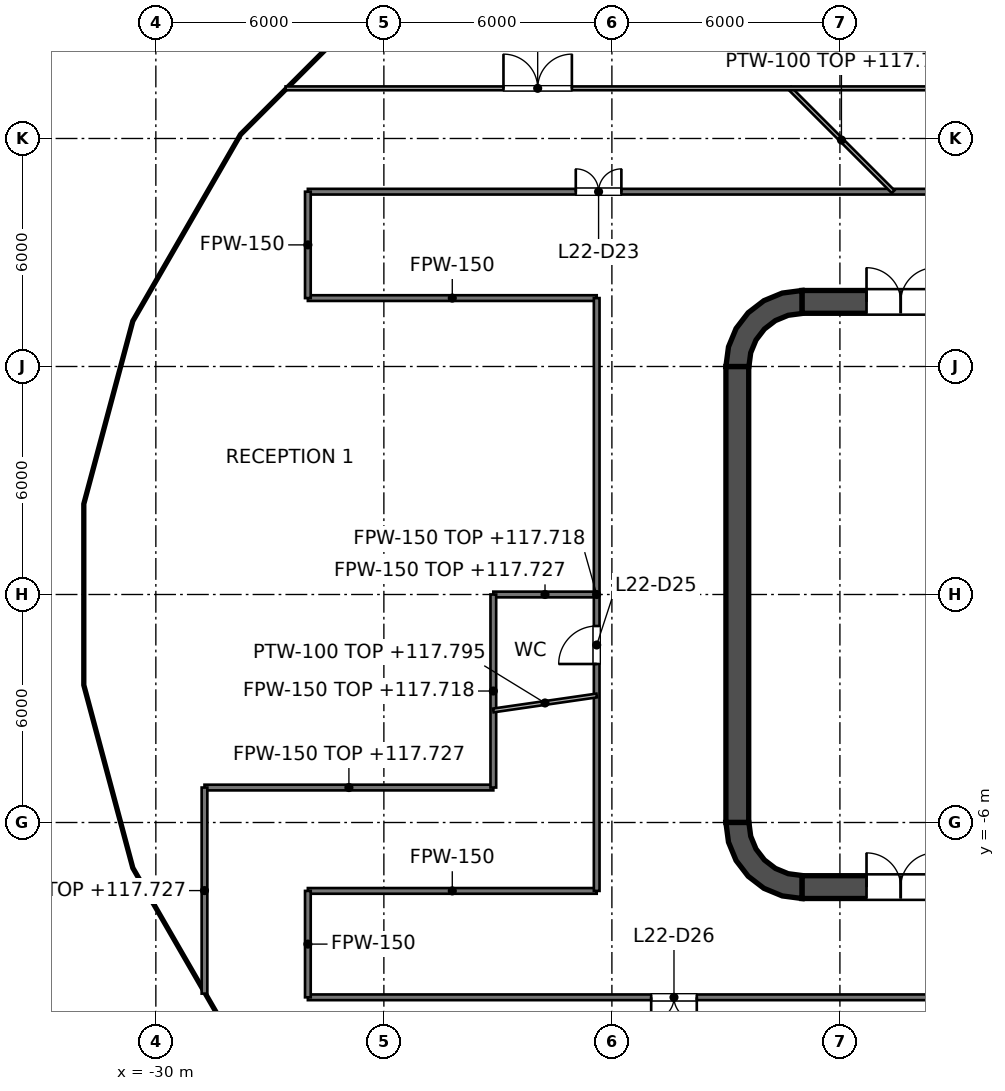
"""IFC4 building model, lengths in metres.
Left out: names, types, materials, properties, quantities, classifications, styles, units other than length and angle.
Written with IfcOpenShell. Run it as: python <this file> out.ifc"""

import sys

from ifc_helpers import new_model, si_unit, direction, frame, frame_2d, origin, place, context, subcontext, project, spatial, polyline, rectangle, outline, extrude, element, fill, save


model = new_model("IFC4")
c1 = context("Model", 3, precision=1e-05, world=origin(), true_north=direction((0.0, 1.0)))
c2 = subcontext(c1, "Body", "Model", "MODEL_VIEW")
j1 = project(units=[si_unit("LENGTHUNIT", "METRE"), si_unit("PLANEANGLEUNIT", "RADIAN")], contexts=[c1])
p1 = place(None, origin())
s1 = spatial("IfcSite", under=j1, at=p1, CompositionType="ELEMENT")
p2 = place(p1, origin())
s2 = spatial("IfcBuilding", under=s1, at=p2, CompositionType="ELEMENT")
p3 = place(p2, frame((0.0, 0.0, 114.6)))
s3 = spatial("IfcBuildingStorey", under=s2, at=p3, CompositionType="ELEMENT", Elevation=114.6)
p4 = place(p3, frame((-13.0, 7.7, 0.0), z_axis=(0.0, 0.0, 1.0), x_axis=(1.0, 0.0, 0.0)))
e1 = element("IfcWall", 1, at=p4, inside=s3, PredefinedType="SHEAR", context=c2, shape_type="SweptSolid", body=[
    extrude(rectangle(XDim=26.0, YDim=0.6, at=frame_2d((13.0, 0.0))), origin(), (0.0, 0.0, 1.0), 4.2),
])
p5 = place(p4, frame((1.7, 0.0, 0.0)))
e2 = element("IfcOpeningElement", 2, at=p5, cuts=e1, PredefinedType="OPENING", context=c2, shape_type="SweptSolid", body=[
    extrude(rectangle(XDim=1.8, YDim=2.1, at=frame_2d((0.9, 1.05))), frame((0.0, 0.3, 0.0), z_axis=(0.0, -1.0, 0.0), x_axis=(1.0, 0.0, 0.0)), (0.0, 0.0, 1.0), 0.6),
])
p6 = place(p4, frame((22.5, 0.0, 0.0)))
e3 = element("IfcOpeningElement", 3, at=p6, cuts=e1, PredefinedType="OPENING", context=c2, shape_type="SweptSolid", body=[
    extrude(rectangle(XDim=1.8, YDim=2.1, at=frame_2d((0.9, 1.05))), frame((0.0, 0.3, 0.0), z_axis=(0.0, -1.0, 0.0), x_axis=(1.0, 0.0, 0.0)), (0.0, 0.0, 1.0), 0.6),
])
p7 = place(p3, frame((-13.0, -7.7, 0.0), z_axis=(0.0, 0.0, 1.0), x_axis=(1.0, 0.0, 0.0)))
e4 = element("IfcWall", 4, at=p7, inside=s3, PredefinedType="SHEAR", context=c2, shape_type="SweptSolid", body=[
    extrude(rectangle(XDim=26.0, YDim=0.6, at=frame_2d((13.0, 0.0))), origin(), (0.0, 0.0, 1.0), 4.2),
])
p8 = place(p7, frame((1.7, 0.0, 0.0)))
e5 = element("IfcOpeningElement", 5, at=p8, cuts=e4, PredefinedType="OPENING", context=c2, shape_type="SweptSolid", body=[
    extrude(rectangle(XDim=1.8, YDim=2.1, at=frame_2d((0.9, 1.05))), frame((0.0, 0.3, 0.0), z_axis=(0.0, -1.0, 0.0), x_axis=(1.0, 0.0, 0.0)), (0.0, 0.0, 1.0), 0.6),
])
p9 = place(p7, frame((22.5, 0.0, 0.0)))
e6 = element("IfcOpeningElement", 6, at=p9, cuts=e4, PredefinedType="OPENING", context=c2, shape_type="SweptSolid", body=[
    extrude(rectangle(XDim=1.8, YDim=2.1, at=frame_2d((0.9, 1.05))), frame((0.0, 0.3, 0.0), z_axis=(0.0, -1.0, 0.0), x_axis=(1.0, 0.0, 0.0)), (0.0, 0.0, 1.0), 0.6),
])
p10 = place(p3, frame((-14.7, -6.0, 0.0), z_axis=(0.0, 0.0, 1.0), x_axis=(0.0, 1.0, 0.0)))
e7 = element("IfcWall", 7, at=p10, inside=s3, PredefinedType="SHEAR", context=c2, shape_type="SweptSolid", body=[
    extrude(rectangle(XDim=12.0, YDim=0.6, at=frame_2d((6.0, 0.0))), origin(), (0.0, 0.0, 1.0), 4.2),
])
p11 = place(p3, origin())
e8 = element("IfcWall", 8, at=p11, inside=s3, PredefinedType="SHEAR", context=c2, shape_type="SweptSolid", body=[
    extrude(outline(polyline([(-15.0, 6.0), (-14.395, 6.0), (-14.347, 6.361), (-14.208, 6.698), (-13.986, 6.986), (-13.698, 7.208), (-13.361, 7.347), (-13.0, 7.395), (-13.0, 8.0), (-13.518, 7.932), (-14.0, 7.732), (-14.414, 7.414), (-14.732, 7.0), (-14.932, 6.518), (-15.0, 6.0)])), origin(), (0.0, 0.0, 1.0), 4.2),
])
e9 = element("IfcWall", 9, at=p11, inside=s3, PredefinedType="SHEAR", context=c2, shape_type="SweptSolid", body=[
    extrude(outline(polyline([(-13.0, -8.0), (-13.0, -7.395), (-13.361, -7.347), (-13.698, -7.208), (-13.986, -6.986), (-14.208, -6.698), (-14.347, -6.361), (-14.395, -6.0), (-15.0, -6.0), (-14.932, -6.518), (-14.732, -7.0), (-14.414, -7.414), (-14.0, -7.732), (-13.518, -7.932), (-13.0, -8.0)])), origin(), (0.0, 0.0, 1.0), 4.2),
])
p12 = place(p3, frame((-11.8, -7.4, 0.0), z_axis=(0.0, 0.0, 1.0), x_axis=(0.0, 1.0, 0.0)))
e10 = element("IfcWall", 10, at=p12, inside=s3, PredefinedType="SOLIDWALL", context=c2, shape_type="SweptSolid", body=[
    extrude(rectangle(XDim=14.8, YDim=0.4, at=frame_2d((7.4, 0.0))), origin(), (0.0, 0.0, 1.0), 4.05),
])
p13 = place(p12, frame((11.2, 0.0, 0.0)))
e11 = element("IfcOpeningElement", 11, at=p13, cuts=e10, PredefinedType="OPENING", context=c2, shape_type="SweptSolid", body=[
    extrude(rectangle(XDim=1.1, YDim=2.1, at=frame_2d((0.55, 1.05))), frame((0.0, 0.2, 0.0), z_axis=(0.0, -1.0, 0.0), x_axis=(1.0, 0.0, 0.0)), (0.0, 0.0, 1.0), 0.4),
])
p14 = place(p12, frame((8.3, 0.0, 0.0)))
e12 = element("IfcOpeningElement", 12, at=p14, cuts=e10, PredefinedType="OPENING", context=c2, shape_type="SweptSolid", body=[
    extrude(rectangle(XDim=1.1, YDim=2.1, at=frame_2d((0.55, 1.05))), frame((0.0, 0.2, 0.0), z_axis=(0.0, -1.0, 0.0), x_axis=(1.0, 0.0, 0.0)), (0.0, 0.0, 1.0), 0.4),
])
p15 = place(p12, frame((5.4, 0.0, 0.0)))
e13 = element("IfcOpeningElement", 13, at=p15, cuts=e10, PredefinedType="OPENING", context=c2, shape_type="SweptSolid", body=[
    extrude(rectangle(XDim=1.1, YDim=2.1, at=frame_2d((0.55, 1.05))), frame((0.0, 0.2, 0.0), z_axis=(0.0, -1.0, 0.0), x_axis=(1.0, 0.0, 0.0)), (0.0, 0.0, 1.0), 0.4),
])
p16 = place(p12, frame((13.552, 0.0, 0.0)))
e14 = element("IfcOpeningElement", 14, at=p16, cuts=e10, PredefinedType="OPENING", context=c2, shape_type="SweptSolid", body=[
    extrude(rectangle(XDim=0.9, YDim=2.1, at=frame_2d((0.45, 1.05))), frame((0.0, 0.2, 0.0), z_axis=(0.0, -1.0, 0.0), x_axis=(1.0, 0.0, 0.0)), (0.0, 0.0, 1.0), 0.4),
])
p17 = place(p12, frame((0.347, 0.0, 0.0)))
e15 = element("IfcOpeningElement", 15, at=p17, cuts=e10, PredefinedType="OPENING", context=c2, shape_type="SweptSolid", body=[
    extrude(rectangle(XDim=0.9, YDim=2.1, at=frame_2d((0.45, 1.05))), frame((0.0, 0.2, 0.0), z_axis=(0.0, -1.0, 0.0), x_axis=(1.0, 0.0, 0.0)), (0.0, 0.0, 1.0), 0.4),
])
e16 = element("IfcWall", 16, at=p11, inside=s3, PredefinedType="SOLIDWALL", context=c2, shape_type="SweptSolid", body=[
    extrude(outline(polyline([(-12.0, -5.925), (-12.0, -5.675), (-14.15, -5.675), (-14.15, -3.025), (-12.0, -3.025), (-12.0, -2.775), (-14.15, -2.775), (-14.15, -0.125), (-12.0, -0.125), (-12.0, 0.125), (-14.15, 0.125), (-14.15, 2.775), (-12.0, 2.775), (-12.0, 3.025), (-14.15, 3.025), (-14.15, 5.675), (-12.0, 5.675), (-12.0, 5.925), (-14.15, 5.925), (-14.4, 5.925), (-14.4, 5.675), (-14.4, 3.025), (-14.4, 2.775), (-14.4, 0.125), (-14.4, -0.125), (-14.4, -2.775), (-14.4, -3.025), (-14.4, -5.675), (-14.4, -5.925), (-14.15, -5.925), (-12.0, -5.925)])), origin(), (0.0, 0.0, 1.0), 4.05),
])
p18 = place(p3, frame((-26.0, -10.6, 0.0), z_axis=(0.0, 0.0, 1.0), x_axis=(1.0, 0.0, 0.0)))
e17 = element("IfcWall", 17, at=p18, inside=s3, PredefinedType="PARTITIONING", context=c2, shape_type="SweptSolid", body=[
    extrude(rectangle(XDim=52.0, YDim=0.15, at=frame_2d((26.0, 0.0))), origin(), (0.0, 0.0, 1.0), 3.127),
])
p19 = place(p18, frame((9.034, 0.0, 0.0)))
e18 = element("IfcOpeningElement", 18, at=p19, cuts=e17, PredefinedType="OPENING", context=c2, shape_type="SweptSolid", body=[
    extrude(rectangle(XDim=1.2, YDim=2.1, at=frame_2d((0.6, 1.05))), frame((0.0, 0.075, 0.0), z_axis=(0.0, -1.0, 0.0), x_axis=(1.0, 0.0, 0.0)), (0.0, 0.0, 1.0), 0.15),
])
p20 = place(p18, frame((19.767, 0.0, 0.0)))
e19 = element("IfcOpeningElement", 19, at=p20, cuts=e17, PredefinedType="OPENING", context=c2, shape_type="SweptSolid", body=[
    extrude(rectangle(XDim=1.0, YDim=2.1, at=frame_2d((0.5, 1.05))), frame((0.0, 0.075, 0.0), z_axis=(0.0, -1.0, 0.0), x_axis=(1.0, 0.0, 0.0)), (0.0, 0.0, 1.0), 0.15),
])
p21 = place(p18, frame((21.763, 0.0, 0.0)))
e20 = element("IfcOpeningElement", 20, at=p21, cuts=e17, PredefinedType="OPENING", context=c2, shape_type="SweptSolid", body=[
    extrude(rectangle(XDim=1.0, YDim=2.1, at=frame_2d((0.5, 1.05))), frame((0.0, 0.075, 0.0), z_axis=(0.0, -1.0, 0.0), x_axis=(1.0, 0.0, 0.0)), (0.0, 0.0, 1.0), 0.15),
])
p22 = place(p18, frame((29.38, 0.0, 0.0)))
e21 = element("IfcOpeningElement", 21, at=p22, cuts=e17, PredefinedType="OPENING", context=c2, shape_type="SweptSolid", body=[
    extrude(rectangle(XDim=1.0, YDim=2.1, at=frame_2d((0.5, 1.05))), frame((0.0, 0.075, 0.0), z_axis=(0.0, -1.0, 0.0), x_axis=(1.0, 0.0, 0.0)), (0.0, 0.0, 1.0), 0.15),
])
p23 = place(p18, frame((41.202, 0.0, 0.0)))
e22 = element("IfcOpeningElement", 22, at=p23, cuts=e17, PredefinedType="OPENING", context=c2, shape_type="SweptSolid", body=[
    extrude(rectangle(XDim=1.0, YDim=2.1, at=frame_2d((0.5, 1.05))), frame((0.0, 0.075, 0.0), z_axis=(0.0, -1.0, 0.0), x_axis=(1.0, 0.0, 0.0)), (0.0, 0.0, 1.0), 0.15),
])
p24 = place(p3, frame((-26.0, -7.8, 0.0), z_axis=(0.0, 0.0, 1.0), x_axis=(1.0, 0.0, 0.0)))
e23 = element("IfcWall", 23, at=p24, inside=s3, PredefinedType="PARTITIONING", context=c2, shape_type="SweptSolid", body=[
    extrude(rectangle(XDim=7.6, YDim=0.15, at=frame_2d((3.8, 0.0))), origin(), (0.0, 0.0, 1.0), 3.276),
])
p25 = place(p3, frame((-28.72, -5.08, 0.0), z_axis=(0.0, 0.0, 1.0), x_axis=(1.0, 0.0, 0.0)))
e24 = element("IfcWall", 24, at=p25, inside=s3, PredefinedType="PARTITIONING", context=c2, shape_type="SweptSolid", body=[
    extrude(rectangle(XDim=7.6, YDim=0.15, at=frame_2d((3.8, 0.0))), origin(), (0.0, 0.0, 1.0), 3.127),
])
p26 = place(p3, frame((-21.12, 0.0, 0.0), z_axis=(0.0, 0.0, 1.0), x_axis=(1.0, 0.0, 0.0)))
e25 = element("IfcWall", 25, at=p26, inside=s3, PredefinedType="PARTITIONING", context=c2, shape_type="SweptSolid", body=[
    extrude(rectangle(XDim=2.72, YDim=0.15, at=frame_2d((1.36, 0.0))), origin(), (0.0, 0.0, 1.0), 3.127),
])
p27 = place(p3, frame((-26.0, 7.8, 0.0), z_axis=(0.0, 0.0, 1.0), x_axis=(1.0, 0.0, 0.0)))
e26 = element("IfcWall", 26, at=p27, inside=s3, PredefinedType="PARTITIONING", context=c2, shape_type="SweptSolid", body=[
    extrude(rectangle(XDim=7.6, YDim=0.15, at=frame_2d((3.8, 0.0))), origin(), (0.0, 0.0, 1.0), 3.276),
])
p28 = place(p3, frame((-26.0, 10.6, 0.0), z_axis=(0.0, 0.0, 1.0), x_axis=(1.0, 0.0, 0.0)))
e27 = element("IfcWall", 27, at=p28, inside=s3, PredefinedType="PARTITIONING", context=c2, shape_type="SweptSolid", body=[
    extrude(rectangle(XDim=52.0, YDim=0.15, at=frame_2d((26.0, 0.0))), origin(), (0.0, 0.0, 1.0), 3.077),
])
p29 = place(p28, frame((18.729, 0.0, 0.0)))
e28 = element("IfcOpeningElement", 28, at=p29, cuts=e27, PredefinedType="OPENING", context=c2, shape_type="SweptSolid", body=[
    extrude(rectangle(XDim=1.0, YDim=2.1, at=frame_2d((0.5, 1.05))), frame((0.0, 0.075, 0.0), z_axis=(0.0, -1.0, 0.0), x_axis=(1.0, 0.0, 0.0)), (0.0, 0.0, 1.0), 0.15),
])
p30 = place(p28, frame((7.05, 0.0, 0.0)))
e29 = element("IfcOpeningElement", 29, at=p30, cuts=e27, PredefinedType="OPENING", context=c2, shape_type="SweptSolid", body=[
    extrude(rectangle(XDim=1.2, YDim=2.1, at=frame_2d((0.6, 1.05))), frame((0.0, 0.075, 0.0), z_axis=(0.0, -1.0, 0.0), x_axis=(1.0, 0.0, 0.0)), (0.0, 0.0, 1.0), 0.15),
])
p31 = place(p28, frame((40.464, 0.0, 0.0)))
e30 = element("IfcOpeningElement", 30, at=p31, cuts=e27, PredefinedType="OPENING", context=c2, shape_type="SweptSolid", body=[
    extrude(rectangle(XDim=1.0, YDim=2.1, at=frame_2d((0.5, 1.05))), frame((0.0, 0.075, 0.0), z_axis=(0.0, -1.0, 0.0), x_axis=(1.0, 0.0, 0.0)), (0.0, 0.0, 1.0), 0.15),
])
p32 = place(p28, frame((27.09, 0.0, 0.0)))
e31 = element("IfcOpeningElement", 31, at=p32, cuts=e27, PredefinedType="OPENING", context=c2, shape_type="SweptSolid", body=[
    extrude(rectangle(XDim=1.0, YDim=2.1, at=frame_2d((0.5, 1.05))), frame((0.0, 0.075, 0.0), z_axis=(0.0, -1.0, 0.0), x_axis=(1.0, 0.0, 0.0)), (0.0, 0.0, 1.0), 0.15),
])
p33 = place(p3, frame((-18.4, -7.8, 0.0), z_axis=(0.0, 0.0, 1.0), x_axis=(0.0, 1.0, 0.0)))
e32 = element("IfcWall", 32, at=p33, inside=s3, PredefinedType="PARTITIONING", context=c2, shape_type="SweptSolid", body=[
    extrude(rectangle(XDim=15.6, YDim=0.15, at=frame_2d((7.8, 0.0))), origin(), (0.0, 0.0, 1.0), 3.118),
])
p34 = place(p33, frame((5.971, 0.0, 0.0)))
e33 = element("IfcOpeningElement", 33, at=p34, cuts=e32, PredefinedType="OPENING", context=c2, shape_type="SweptSolid", body=[
    extrude(rectangle(XDim=1.0, YDim=2.1, at=frame_2d((0.5, 1.05))), frame((0.0, 0.075, 0.0), z_axis=(0.0, -1.0, 0.0), x_axis=(1.0, 0.0, 0.0)), (0.0, 0.0, 1.0), 0.15),
])
p35 = place(p3, frame((-21.12, -5.08, 0.0), z_axis=(0.0, 0.0, 1.0), x_axis=(0.0, 1.0, 0.0)))
e34 = element("IfcWall", 34, at=p35, inside=s3, PredefinedType="PARTITIONING", context=c2, shape_type="SweptSolid", body=[
    extrude(rectangle(XDim=5.08, YDim=0.15, at=frame_2d((2.54, 0.0))), origin(), (0.0, 0.0, 1.0), 3.118),
])
for number, where, z_axis, x_axis in (
    (35, (-26.0, -10.6, 0.0), (0.0, 0.0, 1.0), (0.0, 1.0, 0.0)),
    (36, (-26.0, 7.8, 0.0), (0.0, 0.0, 1.0), (0.0, 1.0, 0.0)),
):
    element("IfcWall", number, at=place(p3, frame(where, z_axis=z_axis, x_axis=x_axis)), inside=s3, PredefinedType="PARTITIONING", context=c2, shape_type="SweptSolid", body=[
        extrude(rectangle(XDim=2.8, YDim=0.15, at=frame_2d((1.4, 0.0))), origin(), (0.0, 0.0, 1.0), 3.276),
    ])
p36 = place(p3, frame((-28.72, -10.503, 0.0), z_axis=(0.0, 0.0, 1.0), x_axis=(0.0, 1.0, 0.0)))
e37 = element("IfcWall", 37, at=p36, inside=s3, PredefinedType="PARTITIONING", context=c2, shape_type="SweptSolid", body=[
    extrude(rectangle(XDim=5.423, YDim=0.15, at=frame_2d((2.711, 0.0))), origin(), (0.0, 0.0, 1.0), 3.127),
])
p37 = place(p3, frame((-13.32, 13.32, 0.0), z_axis=(0.0, 0.0, 1.0), x_axis=(0.707106781187, -0.707106781187, 0.0)))
e38 = element("IfcWall", 38, at=p37, inside=s3, PredefinedType="PARTITIONING", context=c2, shape_type="SweptSolid", body=[
    extrude(rectangle(XDim=3.847, YDim=0.1, at=frame_2d((1.923, 0.0))), origin(), (0.0, 0.0, 1.0), 3.195),
])
p38 = place(p3, frame((-26.586, 13.32, 0.0), z_axis=(0.0, 0.0, 1.0), x_axis=(1.0, 0.0, 0.0)))
e39 = element("IfcWall", 39, at=p38, inside=s3, PredefinedType="PARTITIONING", context=c2, shape_type="SweptSolid", body=[
    extrude(rectangle(XDim=53.172, YDim=0.1, at=frame_2d((26.586, 0.0))), origin(), (0.0, 0.0, 1.0), 3.077),
])
p39 = place(p38, frame((5.733, 0.0, 0.0)))
e40 = element("IfcOpeningElement", 40, at=p39, cuts=e39, PredefinedType="OPENING", context=c2, shape_type="SweptSolid", body=[
    extrude(rectangle(XDim=1.8, YDim=2.1, at=frame_2d((0.9, 1.05))), frame((0.0, 0.05, 0.0), z_axis=(0.0, -1.0, 0.0), x_axis=(1.0, 0.0, 0.0)), (0.0, 0.0, 1.0), 0.1),
])
p40 = place(p38, frame((43.224, 0.0, 0.0)))
e41 = element("IfcOpeningElement", 41, at=p40, cuts=e39, PredefinedType="OPENING", context=c2, shape_type="SweptSolid", body=[
    extrude(rectangle(XDim=0.9, YDim=2.1, at=frame_2d((0.45, 1.05))), frame((0.0, 0.05, 0.0), z_axis=(0.0, -1.0, 0.0), x_axis=(1.0, 0.0, 0.0)), (0.0, 0.0, 1.0), 0.1),
])
p41 = place(p38, frame((27.747, 0.0, 0.0)))
e42 = element("IfcOpeningElement", 42, at=p41, cuts=e39, PredefinedType="OPENING", context=c2, shape_type="SweptSolid", body=[
    extrude(rectangle(XDim=1.8, YDim=2.1, at=frame_2d((0.9, 1.05))), frame((0.0, 0.05, 0.0), z_axis=(0.0, -1.0, 0.0), x_axis=(1.0, 0.0, 0.0)), (0.0, 0.0, 1.0), 0.1),
])
p42 = place(p3, frame((-21.12, -3.051, 0.0), z_axis=(0.0, 0.0, 1.0), x_axis=(0.989720814385, 0.143012969948, 0.0)))
e43 = element("IfcWall", 43, at=p42, inside=s3, PredefinedType="PARTITIONING", context=c2, shape_type="SweptSolid", body=[
    extrude(rectangle(XDim=2.749, YDim=0.1, at=frame_2d((1.374, 0.0))), origin(), (0.0, 0.0, 1.0), 3.195),
])
p43 = place(p13, origin())
e44 = element("IfcDoor", 44, at=p43, inside=s3, OperationType="DOUBLE_DOOR_SLIDING", PredefinedType="DOOR", context=c2, shape_type="SweptSolid", body=[
    extrude(rectangle(XDim=1.1, YDim=2.1, at=frame_2d((0.55, 1.05))), frame((0.0, 0.025, 0.0), z_axis=(0.0, -1.0, 0.0), x_axis=(1.0, 0.0, 0.0)), (0.0, 0.0, 1.0), 0.05),
])
fill(e11, e44)
p44 = place(p14, origin())
e45 = element("IfcDoor", 45, at=p44, inside=s3, OperationType="DOUBLE_DOOR_SLIDING", PredefinedType="DOOR", context=c2, shape_type="SweptSolid", body=[
    extrude(rectangle(XDim=1.1, YDim=2.1, at=frame_2d((0.55, 1.05))), frame((0.0, 0.025, 0.0), z_axis=(0.0, -1.0, 0.0), x_axis=(1.0, 0.0, 0.0)), (0.0, 0.0, 1.0), 0.05),
])
fill(e12, e45)
p45 = place(p15, origin())
e46 = element("IfcDoor", 46, at=p45, inside=s3, OperationType="DOUBLE_DOOR_SLIDING", PredefinedType="DOOR", context=c2, shape_type="SweptSolid", body=[
    extrude(rectangle(XDim=1.1, YDim=2.1, at=frame_2d((0.55, 1.05))), frame((0.0, 0.025, 0.0), z_axis=(0.0, -1.0, 0.0), x_axis=(1.0, 0.0, 0.0)), (0.0, 0.0, 1.0), 0.05),
])
fill(e13, e46)
p46 = place(p16, origin())
e47 = element("IfcDoor", 47, at=p46, inside=s3, OperationType="SINGLE_SWING_LEFT", PredefinedType="DOOR", context=c2, shape_type="SweptSolid", body=[
    extrude(rectangle(XDim=0.9, YDim=2.1, at=frame_2d((0.45, 1.05))), frame((0.0, 0.025, 0.0), z_axis=(0.0, -1.0, 0.0), x_axis=(1.0, 0.0, 0.0)), (0.0, 0.0, 1.0), 0.05),
])
fill(e14, e47)
p47 = place(p17, origin())
e48 = element("IfcDoor", 48, at=p47, inside=s3, OperationType="SINGLE_SWING_LEFT", PredefinedType="DOOR", context=c2, shape_type="SweptSolid", body=[
    extrude(rectangle(XDim=0.9, YDim=2.1, at=frame_2d((0.45, 1.05))), frame((0.0, 0.025, 0.0), z_axis=(0.0, -1.0, 0.0), x_axis=(1.0, 0.0, 0.0)), (0.0, 0.0, 1.0), 0.05),
])
fill(e15, e48)
p48 = place(p5, origin())
e49 = element("IfcDoor", 49, at=p48, inside=s3, OperationType="DOUBLE_DOOR_SINGLE_SWING", PredefinedType="DOOR", context=c2, shape_type="SweptSolid", body=[
    extrude(rectangle(XDim=1.8, YDim=2.1, at=frame_2d((0.9, 1.05))), frame((0.0, 0.025, 0.0), z_axis=(0.0, -1.0, 0.0), x_axis=(1.0, 0.0, 0.0)), (0.0, 0.0, 1.0), 0.05),
])
fill(e2, e49)
p49 = place(p8, origin())
e50 = element("IfcDoor", 50, at=p49, inside=s3, OperationType="DOUBLE_DOOR_SINGLE_SWING", PredefinedType="DOOR", context=c2, shape_type="SweptSolid", body=[
    extrude(rectangle(XDim=1.8, YDim=2.1, at=frame_2d((0.9, 1.05))), frame((0.0, 0.025, 0.0), z_axis=(0.0, -1.0, 0.0), x_axis=(1.0, 0.0, 0.0)), (0.0, 0.0, 1.0), 0.05),
])
fill(e5, e50)
p50 = place(p30, origin())
e51 = element("IfcDoor", 51, at=p50, inside=s3, OperationType="DOUBLE_DOOR_SINGLE_SWING", PredefinedType="DOOR", context=c2, shape_type="SweptSolid", body=[
    extrude(rectangle(XDim=1.2, YDim=2.1, at=frame_2d((0.6, 1.05))), frame((0.0, 0.025, 0.0), z_axis=(0.0, -1.0, 0.0), x_axis=(1.0, 0.0, 0.0)), (0.0, 0.0, 1.0), 0.05),
])
fill(e29, e51)
p51 = place(p39, origin())
e52 = element("IfcDoor", 52, at=p51, inside=s3, OperationType="DOUBLE_DOOR_SINGLE_SWING", PredefinedType="DOOR", context=c2, shape_type="SweptSolid", body=[
    extrude(rectangle(XDim=1.8, YDim=2.1, at=frame_2d((0.9, 1.05))), frame((0.0, 0.025, 0.0), z_axis=(0.0, -1.0, 0.0), x_axis=(1.0, 0.0, 0.0)), (0.0, 0.0, 1.0), 0.05),
])
fill(e40, e52)
p52 = place(p34, origin())
e53 = element("IfcDoor", 53, at=p52, inside=s3, OperationType="SINGLE_SWING_LEFT", PredefinedType="DOOR", context=c2, shape_type="SweptSolid", body=[
    extrude(rectangle(XDim=1.0, YDim=2.1, at=frame_2d((0.5, 1.05))), frame((0.0, 0.025, 0.0), z_axis=(0.0, -1.0, 0.0), x_axis=(1.0, 0.0, 0.0)), (0.0, 0.0, 1.0), 0.05),
])
fill(e33, e53)
p53 = place(p19, origin())
e54 = element("IfcDoor", 54, at=p53, inside=s3, OperationType="DOUBLE_DOOR_SINGLE_SWING", PredefinedType="DOOR", context=c2, shape_type="SweptSolid", body=[
    extrude(rectangle(XDim=1.2, YDim=2.1, at=frame_2d((0.6, 1.05))), frame((0.0, 0.025, 0.0), z_axis=(0.0, -1.0, 0.0), x_axis=(1.0, 0.0, 0.0)), (0.0, 0.0, 1.0), 0.05),
])
fill(e18, e54)
save(model, sys.argv[1])
